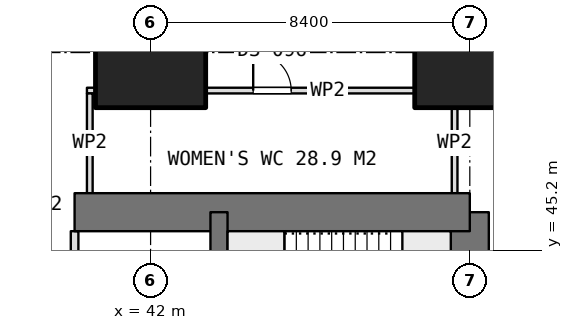
"""IFC4 building model, lengths in metres.
Left out: names, types, materials, properties, quantities, classifications, styles, units other than length and angle.
Written with IfcOpenShell. Run it as: python <this file> out.ifc"""

import sys

from ifc_helpers import new_model, si_unit, direction, frame, frame_2d, origin, origin_2d, place, context, subcontext, project, spatial, rectangle, extrude, element, fill, save


model = new_model("IFC4")
c1 = context("Model", 3, precision=1e-05, world=origin(), true_north=direction((0.0, 1.0)))
c2 = subcontext(c1, "Body", "Model", "MODEL_VIEW")
j1 = project(units=[si_unit("LENGTHUNIT", "METRE"), si_unit("PLANEANGLEUNIT", "RADIAN")], contexts=[c1])
p1 = place(None, origin())
s1 = spatial("IfcSite", under=j1, at=p1, CompositionType="ELEMENT")
p2 = place(p1, origin())
s2 = spatial("IfcBuilding", under=s1, at=p2, CompositionType="ELEMENT")
p3 = place(p2, frame((0.0, 0.0, 90.8)))
s3 = spatial("IfcBuildingStorey", under=s2, at=p3, CompositionType="ELEMENT", Elevation=90.8)
p4 = place(p3, frame((40.0, 46.2, 0.0), z_axis=(0.0, 0.0, 1.0), x_axis=(1.0, 0.0, 0.0)))
e1 = element("IfcWall", 1, at=p4, inside=s3, PredefinedType="SHEAR", context=c2, shape_type="SweptSolid", body=[
    extrude(rectangle(XDim=10.4, YDim=1.0, at=frame_2d((5.2, 0.0))), origin(), (0.0, 0.0, 1.0), 4.5),
])
p5 = place(p3, frame((50.4, 21.0, 0.0), z_axis=(0.0, 0.0, 1.0), x_axis=(0.0, 1.0, 0.0)))
e2 = element("IfcWall", 2, at=p5, inside=s3, PredefinedType="SHEAR", context=c2, shape_type="SweptSolid", body=[
    extrude(rectangle(XDim=25.2, YDim=1.0, at=frame_2d((12.6, 0.0))), origin(), (0.0, 0.0, 1.0), 4.5),
])
p6 = place(p5, frame((16.2, 0.0, 0.0)))
e3 = element("IfcOpeningElement", 3, at=p6, cuts=e2, PredefinedType="OPENING", context=c2, shape_type="SweptSolid", body=[
    extrude(rectangle(XDim=1.2, YDim=2.1, at=frame_2d((0.6, 1.05))), frame((0.0, 0.51, 0.0), z_axis=(0.0, -1.0, 0.0), x_axis=(1.0, 0.0, 0.0)), (0.0, 0.0, 1.0), 1.02),
])
p7 = place(p5, frame((10.05, 0.0, 0.0)))
e4 = element("IfcOpeningElement", 4, at=p7, cuts=e2, PredefinedType="OPENING", context=c2, shape_type="SweptSolid", body=[
    extrude(rectangle(XDim=0.9, YDim=2.1, at=frame_2d((0.45, 1.05))), frame((0.0, 0.51, 0.0), z_axis=(0.0, -1.0, 0.0), x_axis=(1.0, 0.0, 0.0)), (0.0, 0.0, 1.0), 1.02),
])
p8 = place(p5, frame((7.45, 0.0, 0.0)))
e5 = element("IfcOpeningElement", 5, at=p8, cuts=e2, PredefinedType="OPENING", context=c2, shape_type="SweptSolid", body=[
    extrude(rectangle(XDim=0.9, YDim=2.1, at=frame_2d((0.45, 1.05))), frame((0.0, 0.51, 0.0), z_axis=(0.0, -1.0, 0.0), x_axis=(1.0, 0.0, 0.0)), (0.0, 0.0, 1.0), 1.02),
])
p9 = place(p5, frame((0.7, 0.0, 0.0)))
e6 = element("IfcOpeningElement", 6, at=p9, cuts=e2, PredefinedType="OPENING", context=c2, shape_type="SweptSolid", body=[
    extrude(rectangle(XDim=1.2, YDim=2.1, at=frame_2d((0.6, 1.05))), frame((0.0, 0.51, 0.0), z_axis=(0.0, -1.0, 0.0), x_axis=(1.0, 0.0, 0.0)), (0.0, 0.0, 1.0), 1.02),
])
p10 = place(p3, frame((43.8, 21.0, 0.0), z_axis=(0.0, 0.0, 1.0), x_axis=(0.0, 1.0, 0.0)))
e7 = element("IfcWall", 7, at=p10, inside=s3, PredefinedType="SHEAR", context=c2, shape_type="SweptSolid", body=[
    extrude(rectangle(XDim=25.2, YDim=0.45, at=frame_2d((12.6, 0.0))), origin(), (0.0, 0.0, 1.0), 4.5),
])
for number, where, z_axis, x_axis in (
    (8, (42.0, 50.4, 0.0), (0.0, 0.0, 1.0), (1.0, 0.0, 0.0)),
    (9, (50.4, 50.4, 0.0), (0.0, 0.0, 1.0), (1.0, 0.0, 0.0)),
):
    element("IfcColumn", number, at=place(p3, frame(where, z_axis=z_axis, x_axis=x_axis)), inside=s3, PredefinedType="COLUMN", context=c2, shape_type="SweptSolid", body=[
        extrude(rectangle(XDim=2.9, YDim=2.9, at=origin_2d()), origin(), (0.0, 0.0, 1.0), 4.5),
    ])
p11 = place(p3, frame((40.0, 41.625, 0.0), z_axis=(0.0, 0.0, 1.0), x_axis=(0.0, 1.0, 0.0)))
e10 = element("IfcWall", 10, at=p11, inside=s3, PredefinedType="PARTITIONING", context=c2, shape_type="SweptSolid", body=[
    extrude(rectangle(XDim=4.075, YDim=0.2, at=frame_2d((2.038, 0.0))), origin(), (0.0, 0.0, 1.0), 4.25),
])
p12 = place(p11, frame((1.725, 0.0, 0.0)))
e11 = element("IfcOpeningElement", 11, at=p12, cuts=e10, PredefinedType="OPENING", context=c2, shape_type="SweptSolid", body=[
    extrude(rectangle(XDim=0.9, YDim=2.1, at=frame_2d((0.45, 1.05))), frame((0.0, 0.11, 0.0), z_axis=(0.0, -1.0, 0.0), x_axis=(1.0, 0.0, 0.0)), (0.0, 0.0, 1.0), 0.22),
])
p13 = place(p3, frame((40.325, 49.4, 0.0), z_axis=(0.0, 0.0, 1.0), x_axis=(1.0, 0.0, 0.0)))
e12 = element("IfcWall", 12, at=p13, inside=s3, PredefinedType="PARTITIONING", context=c2, shape_type="SweptSolid", body=[
    extrude(rectangle(XDim=9.75, YDim=0.15, at=frame_2d((4.875, 0.0))), origin(), (0.0, 0.0, 1.0), 4.25),
])
p14 = place(p13, frame((4.375, 0.0, 0.0)))
e13 = element("IfcOpeningElement", 13, at=p14, cuts=e12, PredefinedType="OPENING", context=c2, shape_type="SweptSolid", body=[
    extrude(rectangle(XDim=1.0, YDim=2.1, at=frame_2d((0.5, 1.05))), frame((0.0, 0.085, 0.0), z_axis=(0.0, -1.0, 0.0), x_axis=(1.0, 0.0, 0.0)), (0.0, 0.0, 1.0), 0.17),
])
for number, where, z_axis, x_axis in (
    (14, (40.4, 46.7, 0.0), (0.0, 0.0, 1.0), (0.0, 1.0, 0.0)),
    (15, (50.0, 46.7, 0.0), (0.0, 0.0, 1.0), (0.0, 1.0, 0.0)),
):
    element("IfcWall", number, at=place(p3, frame(where, z_axis=z_axis, x_axis=x_axis)), inside=s3, PredefinedType="PARTITIONING", context=c2, shape_type="SweptSolid", body=[
        extrude(rectangle(XDim=2.625, YDim=0.15, at=frame_2d((1.312, 0.0))), origin(), (0.0, 0.0, 1.0), 4.25),
    ])
p15 = place(p14, origin())
e16 = element("IfcDoor", 16, at=p15, inside=s3, OperationType="SINGLE_SWING_LEFT", PredefinedType="DOOR", context=c2, shape_type="SweptSolid", body=[
    extrude(rectangle(XDim=1.0, YDim=2.1, at=frame_2d((0.5, 1.05))), frame((0.0, 0.025, 0.0), z_axis=(0.0, -1.0, 0.0), x_axis=(1.0, 0.0, 0.0)), (0.0, 0.0, 1.0), 0.05),
])
fill(e13, e16)
save(model, sys.argv[1])
